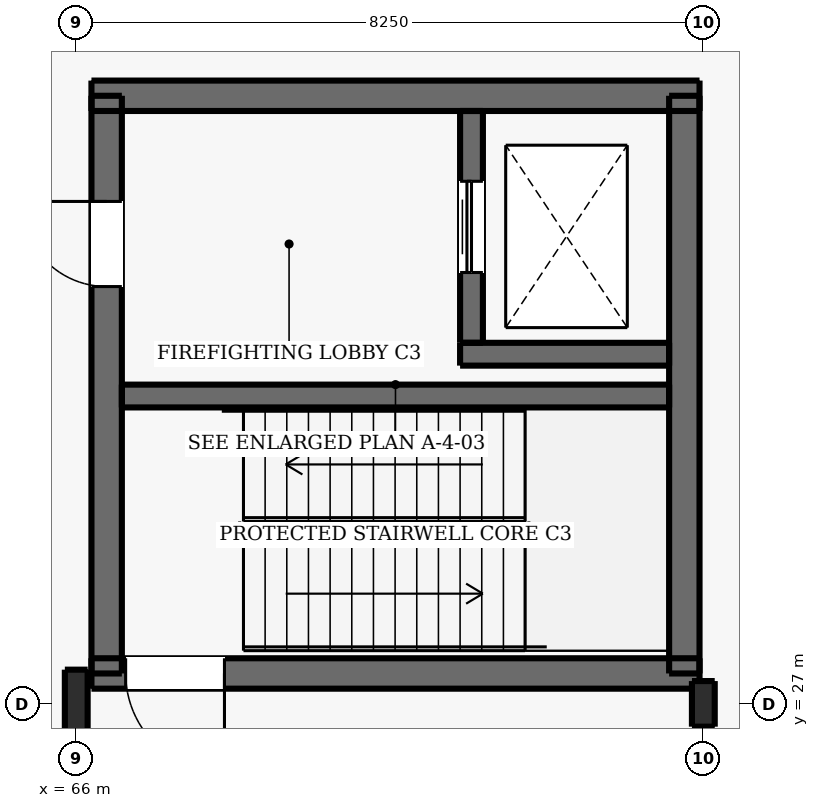
"""IFC4 building model, lengths in metres.
Left out: names, types, materials, properties, quantities, classifications, styles, units other than length and angle.
Written with IfcOpenShell. Run it as: python <this file> out.ifc"""

import sys

from ifc_helpers import new_model, si_unit, direction, frame, frame_2d, origin, origin_2d, place, context, subcontext, project, spatial, rectangle, i_section, extrude, element, fill, save


model = new_model("IFC4")
c1 = context("Model", 3, precision=1e-05, world=origin(), true_north=direction((0.0, 1.0)))
c2 = subcontext(c1, "Body", "Model", "MODEL_VIEW")
j1 = project(units=[si_unit("LENGTHUNIT", "METRE"), si_unit("PLANEANGLEUNIT", "RADIAN")], contexts=[c1])
p1 = place(None, origin())
s1 = spatial("IfcSite", under=j1, at=p1, CompositionType="ELEMENT")
p2 = place(p1, origin())
s2 = spatial("IfcBuilding", under=s1, at=p2, CompositionType="ELEMENT")
p3 = place(p2, frame((0.0, 0.0, -4.8)))
s3 = spatial("IfcBuildingStorey", under=s2, at=p3, CompositionType="ELEMENT", Elevation=-4.8)
p4 = place(p3, frame((66.0, 27.0, 0.0), z_axis=(0.0, 0.0, 1.0), x_axis=(1.0, 0.0, 0.0)))
e1 = element("IfcColumn", 1, at=p4, inside=s3, PredefinedType="COLUMN", context=c2, shape_type="SweptSolid", body=[
    extrude(i_section(OverallWidth=0.3, OverallDepth=0.9, WebThickness=0.019, FlangeThickness=0.035, FilletRadius=0.03, at=origin_2d()), origin(), (0.0, 0.0, 1.0), 4.8),
])
p5 = place(p3, frame((74.25, 27.0, 0.0), z_axis=(0.0, 0.0, 1.0), x_axis=(1.0, 0.0, 0.0)))
e2 = element("IfcColumn", 2, at=p5, inside=s3, PredefinedType="COLUMN", context=c2, shape_type="SweptSolid", body=[
    extrude(i_section(OverallWidth=0.3, OverallDepth=0.6, WebThickness=0.015, FlangeThickness=0.03, FilletRadius=0.027, at=origin_2d()), origin(), (0.0, 0.0, 1.0), 4.8),
])
p6 = place(p3, frame((66.2, 27.4, 0.0), z_axis=(0.0, 0.0, 1.0), x_axis=(1.0, 0.0, 0.0)))
e3 = element("IfcWall", 3, at=p6, inside=s3, PredefinedType="SHEAR", context=c2, shape_type="SweptSolid", body=[
    extrude(rectangle(XDim=8.0, YDim=0.4, at=frame_2d((4.0, 0.0))), origin(), (0.0, 0.0, 1.0), 4.8),
])
p7 = place(p6, frame((0.45, 0.0, 0.0)))
e4 = element("IfcOpeningElement", 4, at=p7, cuts=e3, PredefinedType="OPENING", context=c2, shape_type="SweptSolid", body=[
    extrude(rectangle(XDim=1.3, YDim=2.15, at=frame_2d((0.65, 1.075))), frame((0.0, 0.21, 0.0), z_axis=(0.0, -1.0, 0.0), x_axis=(1.0, 0.0, 0.0)), (0.0, 0.0, 1.0), 0.42),
])
p8 = place(p3, frame((66.2, 35.0, 0.0), z_axis=(0.0, 0.0, 1.0), x_axis=(1.0, 0.0, 0.0)))
e5 = element("IfcWall", 5, at=p8, inside=s3, PredefinedType="SHEAR", context=c2, shape_type="SweptSolid", body=[
    extrude(rectangle(XDim=8.0, YDim=0.4, at=frame_2d((4.0, 0.0))), origin(), (0.0, 0.0, 1.0), 4.8),
])
p9 = place(p3, frame((66.4, 27.4, 0.0), z_axis=(0.0, 0.0, 1.0), x_axis=(0.0, 1.0, 0.0)))
e6 = element("IfcWall", 6, at=p9, inside=s3, PredefinedType="SHEAR", context=c2, shape_type="SweptSolid", body=[
    extrude(rectangle(XDim=7.6, YDim=0.4, at=frame_2d((3.8, 0.0))), origin(), (0.0, 0.0, 1.0), 4.8),
])
p10 = place(p9, frame((5.09, 0.0, 0.0)))
e7 = element("IfcOpeningElement", 7, at=p10, cuts=e6, PredefinedType="OPENING", context=c2, shape_type="SweptSolid", body=[
    extrude(rectangle(XDim=1.12, YDim=2.15, at=frame_2d((0.56, 1.075))), frame((0.0, 0.21, 0.0), z_axis=(0.0, -1.0, 0.0), x_axis=(1.0, 0.0, 0.0)), (0.0, 0.0, 1.0), 0.42),
])
p11 = place(p3, frame((74.0, 27.4, 0.0), z_axis=(0.0, 0.0, 1.0), x_axis=(0.0, 1.0, 0.0)))
e8 = element("IfcWall", 8, at=p11, inside=s3, PredefinedType="SHEAR", context=c2, shape_type="SweptSolid", body=[
    extrude(rectangle(XDim=7.6, YDim=0.4, at=frame_2d((3.8, 0.0))), origin(), (0.0, 0.0, 1.0), 4.8),
])
p12 = place(p3, frame((66.6, 31.05, 0.0), z_axis=(0.0, 0.0, 1.0), x_axis=(1.0, 0.0, 0.0)))
e9 = element("IfcWall", 9, at=p12, inside=s3, PredefinedType="SHEAR", context=c2, shape_type="SweptSolid", body=[
    extrude(rectangle(XDim=7.2, YDim=0.3, at=frame_2d((3.6, 0.0))), origin(), (0.0, 0.0, 1.0), 4.8),
])
p13 = place(p3, frame((71.05, 31.6, 0.0), z_axis=(0.0, 0.0, 1.0), x_axis=(1.0, 0.0, 0.0)))
e10 = element("IfcWall", 10, at=p13, inside=s3, PredefinedType="SHEAR", context=c2, shape_type="SweptSolid", body=[
    extrude(rectangle(XDim=2.75, YDim=0.3, at=frame_2d((1.375, 0.0))), origin(), (0.0, 0.0, 1.0), 4.8),
])
p14 = place(p3, frame((71.2, 31.75, 0.0), z_axis=(0.0, 0.0, 1.0), x_axis=(0.0, 1.0, 0.0)))
e11 = element("IfcWall", 11, at=p14, inside=s3, PredefinedType="SHEAR", context=c2, shape_type="SweptSolid", body=[
    extrude(rectangle(XDim=3.05, YDim=0.3, at=frame_2d((1.525, 0.0))), origin(), (0.0, 0.0, 1.0), 4.8),
])
p15 = place(p14, frame((0.925, 0.0, 0.0)))
e12 = element("IfcOpeningElement", 12, at=p15, cuts=e11, PredefinedType="OPENING", context=c2, shape_type="SweptSolid", body=[
    extrude(rectangle(XDim=1.2, YDim=2.15, at=frame_2d((0.6, 1.075))), frame((0.0, 0.16, 0.0), z_axis=(0.0, -1.0, 0.0), x_axis=(1.0, 0.0, 0.0)), (0.0, 0.0, 1.0), 0.32),
])
p16 = place(p15, origin())
e13 = element("IfcDoor", 13, at=p16, inside=s3, OperationType="DOUBLE_DOOR_SLIDING", PredefinedType="DOOR", context=c2, shape_type="SweptSolid", body=[
    extrude(rectangle(XDim=1.2, YDim=2.15, at=frame_2d((0.6, 1.075))), frame((0.0, 0.025, 0.0), z_axis=(0.0, -1.0, 0.0), x_axis=(1.0, 0.0, 0.0)), (0.0, 0.0, 1.0), 0.05),
])
fill(e12, e13)
p17 = place(p10, origin())
e14 = element("IfcDoor", 14, at=p17, inside=s3, OperationType="SINGLE_SWING_RIGHT", PredefinedType="DOOR", context=c2, shape_type="SweptSolid", body=[
    extrude(rectangle(XDim=1.12, YDim=2.15, at=frame_2d((0.56, 1.075))), frame((0.0, 0.025, 0.0), z_axis=(0.0, -1.0, 0.0), x_axis=(1.0, 0.0, 0.0)), (0.0, 0.0, 1.0), 0.05),
])
fill(e7, e14)
p18 = place(p7, frame((1.3, 0.0, 0.0), z_axis=(0.0, 0.0, 1.0), x_axis=(-1.0, 0.0, 0.0)))
e15 = element("IfcDoor", 15, at=p18, inside=s3, OperationType="SINGLE_SWING_RIGHT", PredefinedType="DOOR", context=c2, shape_type="SweptSolid", body=[
    extrude(rectangle(XDim=1.3, YDim=2.15, at=frame_2d((0.65, 1.075))), frame((0.0, 0.025, 0.0), z_axis=(0.0, -1.0, 0.0), x_axis=(1.0, 0.0, 0.0)), (0.0, 0.0, 1.0), 0.05),
])
fill(e4, e15)
save(model, sys.argv[1])
